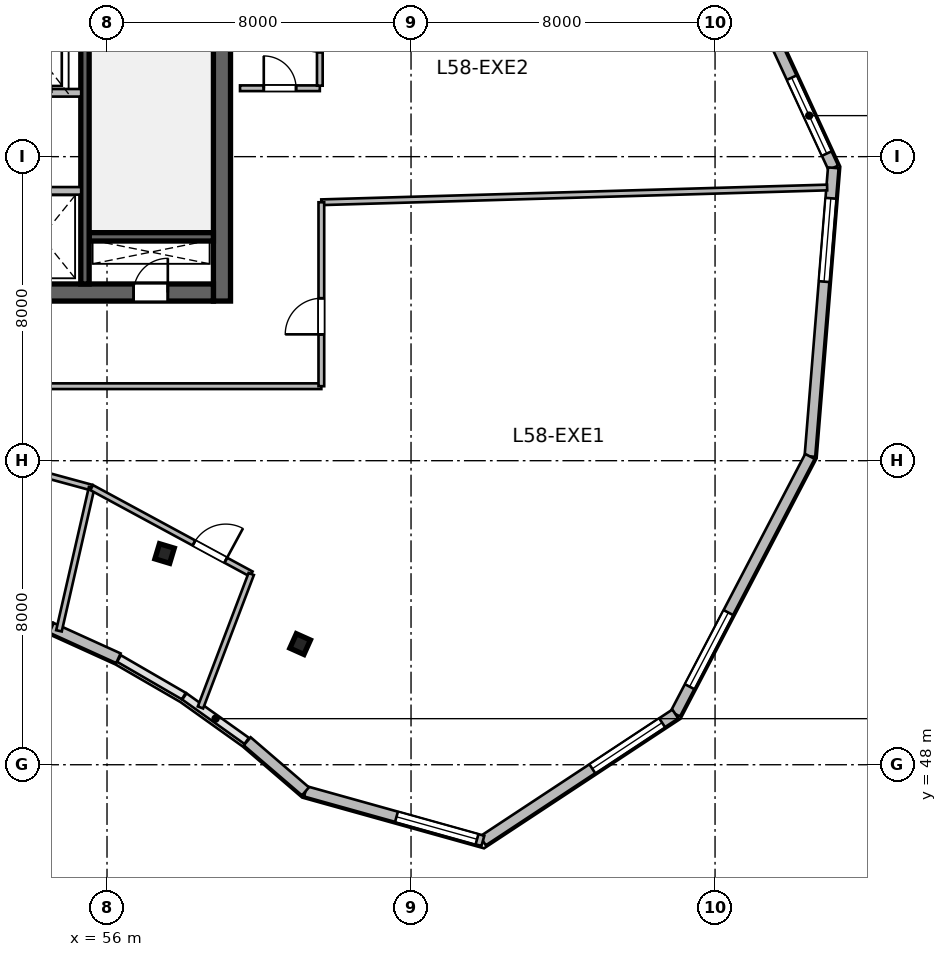
"""IFC4 building model, lengths in metres.
Left out: names, types, materials, properties, quantities, classifications, styles, units other than length and angle.
Written with IfcOpenShell. Run it as: python <this file> out.ifc"""

import sys

from ifc_helpers import new_model, si_unit, direction, frame, frame_2d, origin, origin_2d, place, context, subcontext, project, spatial, rectangle, i_section, extrude, source, transform, mapped, element, fill, save


model = new_model("IFC4")
c1 = context("Model", 3, precision=1e-05, world=origin(), true_north=direction((0.0, 1.0)))
c2 = subcontext(c1, "Body", "Model", "MODEL_VIEW")
j1 = project(units=[si_unit("LENGTHUNIT", "METRE"), si_unit("PLANEANGLEUNIT", "RADIAN")], contexts=[c1])
p1 = place(None, origin())
s1 = spatial("IfcSite", under=j1, at=p1, CompositionType="ELEMENT")
p2 = place(p1, origin())
s2 = spatial("IfcBuilding", under=s1, at=p2, CompositionType="ELEMENT")
p3 = place(p2, frame((0.0, 0.0, 239.1)))
s3 = spatial("IfcBuildingStorey", under=s2, at=p3, CompositionType="ELEMENT", Elevation=239.1)
m1 = source(origin(), c2, "Body", "SweptSolid", [
    extrude(rectangle(XDim=12.0, YDim=0.45, at=frame_2d((6.0, 0.0))), origin(), (0.0, 0.0, 1.0), 3.9),
])
p4 = place(p3, frame((59.025, 60.2, 0.0), z_axis=(0.0, 0.0, 1.0), x_axis=(0.0, 1.0, 0.0)))
e1 = element("IfcWall", 1, at=p4, inside=s3, PredefinedType="SHEAR", context=c2, shape_type="MappedRepresentation", body=[
    mapped(m1, transform((0.0, 0.0, 0.0), scale=1.0)),
])
m2 = source(origin(), c2, "Body", "SweptSolid", [
    extrude(rectangle(XDim=21.6, YDim=0.45, at=frame_2d((10.8, 0.0))), origin(), (0.0, 0.0, 1.0), 3.9),
])
p5 = place(p3, frame((37.2, 60.425, 0.0), z_axis=(0.0, 0.0, 1.0), x_axis=(1.0, 0.0, 0.0)))
e2 = element("IfcWall", 2, at=p5, inside=s3, PredefinedType="SHEAR", context=c2, shape_type="MappedRepresentation", body=[
    mapped(m2, transform((0.0, 0.0, 0.0), scale=1.0)),
])
p6 = place(p5, frame((1.1, 0.0, 0.0)))
e3 = element("IfcOpeningElement", 3, at=p6, cuts=e2, PredefinedType="OPENING", context=c2, shape_type="SweptSolid", body=[
    extrude(rectangle(XDim=1.15, YDim=2.15, at=frame_2d((0.575, 1.075))), frame((0.0, 0.235, 0.0), z_axis=(0.0, -1.0, 0.0), x_axis=(1.0, 0.0, 0.0)), (0.0, 0.0, 1.0), 0.47),
])
p7 = place(p5, frame((19.5, 0.0, 0.0)))
e4 = element("IfcOpeningElement", 4, at=p7, cuts=e2, PredefinedType="OPENING", context=c2, shape_type="SweptSolid", body=[
    extrude(rectangle(XDim=0.9, YDim=2.1, at=frame_2d((0.45, 1.05))), frame((0.0, 0.235, 0.0), z_axis=(0.0, -1.0, 0.0), x_axis=(1.0, 0.0, 0.0)), (0.0, 0.0, 1.0), 0.47),
])
p8 = place(p5, frame((12.02, 0.0, 0.0)))
e5 = element("IfcOpeningElement", 5, at=p8, cuts=e2, PredefinedType="OPENING", context=c2, shape_type="SweptSolid", body=[
    extrude(rectangle(XDim=1.6, YDim=2.15, at=frame_2d((0.8, 1.075))), frame((0.0, 0.235, 0.0), z_axis=(0.0, -1.0, 0.0), x_axis=(1.0, 0.0, 0.0)), (0.0, 0.0, 1.0), 0.47),
])
m3 = source(origin(), c2, "Body", "SweptSolid", [
    extrude(rectangle(XDim=3.27, YDim=0.22, at=frame_2d((1.635, 0.0))), origin(), (0.0, 0.0, 1.0), 3.9),
])
p9 = place(p3, frame((55.53, 61.89, 0.0), z_axis=(0.0, 0.0, 1.0), x_axis=(1.0, 0.0, 0.0)))
e6 = element("IfcWall", 6, at=p9, inside=s3, PredefinedType="SHEAR", context=c2, shape_type="MappedRepresentation", body=[
    mapped(m3, transform((0.0, 0.0, 0.0), scale=1.0)),
])
m4 = source(origin(), c2, "Body", "SweptSolid", [
    extrude(rectangle(XDim=11.1, YDim=0.22, at=frame_2d((5.55, 0.0))), origin(), (0.0, 0.0, 1.0), 3.9),
])
p10 = place(p3, frame((55.42, 60.65, 0.0), z_axis=(0.0, 0.0, 1.0), x_axis=(0.0, 1.0, 0.0)))
e7 = element("IfcWall", 7, at=p10, inside=s3, PredefinedType="SHEAR", context=c2, shape_type="MappedRepresentation", body=[
    mapped(m4, transform((0.0, 0.0, 0.0), scale=1.0)),
])
p11 = place(p10, frame((9.595, 0.0, 0.0)))
e8 = element("IfcOpeningElement", 8, at=p11, cuts=e7, PredefinedType="OPENING", context=c2, shape_type="SweptSolid", body=[
    extrude(rectangle(XDim=1.15, YDim=2.15, at=frame_2d((0.575, 1.075))), frame((0.0, 0.12, 0.0), z_axis=(0.0, -1.0, 0.0), x_axis=(1.0, 0.0, 0.0)), (0.0, 0.0, 1.0), 0.24),
])
m5 = source(origin(), c2, "Body", "SweptSolid", [
    extrude(i_section(OverallWidth=0.406, OverallDepth=0.416, WebThickness=0.03, FlangeThickness=0.048, at=origin_2d()), origin(), (0.0, 0.0, 1.0), 3.9),
])
for number, where, z_axis, x_axis in (
    (9, (57.515, 53.558, 0.0), (0.0, 0.0, 1.0), (0.289, 0.957, 0.0)),
    (10, (61.082, 51.175, 0.0), (0.0, 0.0, 1.0), (0.409, 0.912, 0.0)),
):
    element("IfcColumn", number, at=place(p3, frame(where, z_axis=z_axis, x_axis=x_axis)), inside=s3, PredefinedType="COLUMN", context=c2, shape_type="MappedRepresentation", body=[
        mapped(m5, transform((0.0, 0.0, 0.0), scale=1.0)),
    ])
m6 = source(origin(), c2, "Body", "SweptSolid", [
    extrude(rectangle(XDim=6.05, YDim=0.28, at=frame_2d((3.025, 0.0))), origin(), (0.0, 0.0, 1.0), 3.65),
])
p12 = place(p3, frame((72.574, 69.198, 0.0), z_axis=(0.0, 0.0, 1.0), x_axis=(0.41942922905, -0.907788037935, 0.0)))
e11 = element("IfcWall", 11, at=p12, inside=s3, PredefinedType="SOLIDWALL", context=c2, shape_type="MappedRepresentation", body=[
    mapped(m6, transform((0.0, 0.0, 0.0), scale=1.0)),
])
p13 = place(p12, frame((3.437, 0.0, 0.95)))
e12 = element("IfcOpeningElement", 12, at=p13, cuts=e11, PredefinedType="OPENING", context=c2, shape_type="SweptSolid", body=[
    extrude(rectangle(XDim=2.2, YDim=2.1, at=frame_2d((1.1, 1.05))), frame((0.0, 0.15, 0.0), z_axis=(0.0, -1.0, 0.0), x_axis=(1.0, 0.0, 0.0)), (0.0, 0.0, 1.0), 0.3),
])
m7 = source(origin(), c2, "Body", "SweptSolid", [
    extrude(rectangle(XDim=7.618, YDim=0.28, at=frame_2d((3.809, 0.0))), origin(), (0.0, 0.0, 1.0), 3.65),
])
p14 = place(p3, frame((75.112, 63.707, 0.0), z_axis=(0.0, 0.0, 1.0), x_axis=(-0.080820171031, -0.996728699273, 0.0)))
e13 = element("IfcWall", 13, at=p14, inside=s3, PredefinedType="SOLIDWALL", context=c2, shape_type="MappedRepresentation", body=[
    mapped(m7, transform((0.0, 0.0, 0.0), scale=1.0)),
])
p15 = place(p14, frame((0.805, 0.0, 0.95)))
e14 = element("IfcOpeningElement", 14, at=p15, cuts=e13, PredefinedType="OPENING", context=c2, shape_type="SweptSolid", body=[
    extrude(rectangle(XDim=2.2, YDim=2.1, at=frame_2d((1.1, 1.05))), frame((0.0, 0.15, 0.0), z_axis=(0.0, -1.0, 0.0), x_axis=(1.0, 0.0, 0.0)), (0.0, 0.0, 1.0), 0.3),
])
m8 = source(origin(), c2, "Body", "SweptSolid", [
    extrude(rectangle(XDim=7.648, YDim=0.28, at=frame_2d((3.824, 0.0))), origin(), (0.0, 0.0, 1.0), 3.65),
])
p16 = place(p3, frame((74.496, 56.113, 0.0), z_axis=(0.0, 0.0, 1.0), x_axis=(-0.463116873665, -0.886297219519, 0.0)))
e15 = element("IfcWall", 15, at=p16, inside=s3, PredefinedType="SOLIDWALL", context=c2, shape_type="MappedRepresentation", body=[
    mapped(m8, transform((0.0, 0.0, 0.0), scale=1.0)),
])
p17 = place(p16, frame((4.636, 0.0, 0.95)))
e16 = element("IfcOpeningElement", 16, at=p17, cuts=e15, PredefinedType="OPENING", context=c2, shape_type="SweptSolid", body=[
    extrude(rectangle(XDim=2.2, YDim=2.1, at=frame_2d((1.1, 1.05))), frame((0.0, 0.15, 0.0), z_axis=(0.0, -1.0, 0.0), x_axis=(1.0, 0.0, 0.0)), (0.0, 0.0, 1.0), 0.3),
])
m9 = source(origin(), c2, "Body", "SweptSolid", [
    extrude(rectangle(XDim=6.065, YDim=0.28, at=frame_2d((3.033, 0.0))), origin(), (0.0, 0.0, 1.0), 3.65),
])
p18 = place(p3, frame((70.954, 49.335, 0.0), z_axis=(0.0, 0.0, 1.0), x_axis=(-0.834857303202, -0.550466423399, 0.0)))
e17 = element("IfcWall", 17, at=p18, inside=s3, PredefinedType="SOLIDWALL", context=c2, shape_type="MappedRepresentation", body=[
    mapped(m9, transform((0.0, 0.0, 0.0), scale=1.0)),
])
p19 = place(p18, frame((0.416, 0.0, 0.95)))
e18 = element("IfcOpeningElement", 18, at=p19, cuts=e17, PredefinedType="OPENING", context=c2, shape_type="SweptSolid", body=[
    extrude(rectangle(XDim=2.2, YDim=2.1, at=frame_2d((1.1, 1.05))), frame((0.0, 0.15, 0.0), z_axis=(0.0, -1.0, 0.0), x_axis=(1.0, 0.0, 0.0)), (0.0, 0.0, 1.0), 0.3),
])
m10 = source(origin(), c2, "Body", "SweptSolid", [
    extrude(rectangle(XDim=4.847, YDim=0.28, at=frame_2d((2.424, 0.0))), origin(), (0.0, 0.0, 1.0), 3.65),
])
p20 = place(p3, frame((65.891, 45.996, 0.0), z_axis=(0.0, 0.0, 1.0), x_axis=(-0.963208430762, 0.268755500238, 0.0)))
e19 = element("IfcWall", 19, at=p20, inside=s3, PredefinedType="SOLIDWALL", context=c2, shape_type="MappedRepresentation", body=[
    mapped(m10, transform((0.0, 0.0, 0.0), scale=1.0)),
])
p21 = place(p20, frame((0.16, 0.0, 0.95)))
e20 = element("IfcOpeningElement", 20, at=p21, cuts=e19, PredefinedType="OPENING", context=c2, shape_type="SweptSolid", body=[
    extrude(rectangle(XDim=2.2, YDim=2.1, at=frame_2d((1.1, 1.05))), frame((0.0, 0.15, 0.0), z_axis=(0.0, -1.0, 0.0), x_axis=(1.0, 0.0, 0.0)), (0.0, 0.0, 1.0), 0.3),
])
m11 = source(origin(), c2, "Body", "SweptSolid", [
    extrude(rectangle(XDim=2.022, YDim=0.28, at=frame_2d((1.011, 0.0))), origin(), (0.0, 0.0, 1.0), 3.65),
])
p22 = place(p3, frame((61.222, 47.299, 0.0), z_axis=(0.0, 0.0, 1.0), x_axis=(-0.758343943716, 0.651854633358, 0.0)))
e21 = element("IfcWall", 21, at=p22, inside=s3, PredefinedType="SOLIDWALL", context=c2, shape_type="MappedRepresentation", body=[
    mapped(m11, transform((0.0, 0.0, 0.0), scale=1.0)),
])
m12 = source(origin(), c2, "Body", "SweptSolid", [
    extrude(rectangle(XDim=1.933, YDim=0.28, at=frame_2d((0.966, 0.0))), origin(), (0.0, 0.0, 1.0), 3.65),
])
p23 = place(p3, frame((56.3, 50.802, 0.0), z_axis=(0.0, 0.0, 1.0), x_axis=(-0.910478916145, 0.413555489936, 0.0)))
e22 = element("IfcWall", 22, at=p23, inside=s3, PredefinedType="SOLIDWALL", context=c2, shape_type="MappedRepresentation", body=[
    mapped(m12, transform((0.0, 0.0, 0.0), scale=1.0)),
])
m13 = source(origin(), c2, "Body", "SweptSolid", [
    extrude(rectangle(XDim=1.901, YDim=0.28, at=frame_2d((0.951, 0.0))), origin(), (0.0, 0.0, 1.0), 3.65),
])
p24 = place(p3, frame((54.523, 51.608, 0.0), z_axis=(0.0, 0.0, 1.0), x_axis=(-0.94793587841, 0.318461254194, 0.0)))
e23 = element("IfcWall", 23, at=p24, inside=s3, PredefinedType="SOLIDWALL", context=c2, shape_type="MappedRepresentation", body=[
    mapped(m13, transform((0.0, 0.0, 0.0), scale=1.0)),
])
m14 = source(origin(), c2, "Body", "SweptSolid", [
    extrude(rectangle(XDim=5.62, YDim=0.2, at=frame_2d((2.81, 0.0))), origin(), (0.0, 0.0, 1.0), 3.65),
])
p25 = place(p3, frame((49.7, 65.68, 0.0), z_axis=(0.0, 0.0, 1.0), x_axis=(1.0, 0.0, 0.0)))
e24 = element("IfcWall", 24, at=p25, inside=s3, PredefinedType="SOLIDWALL", context=c2, shape_type="MappedRepresentation", body=[
    mapped(m14, transform((0.0, 0.0, 0.0), scale=1.0)),
])
m15 = source(origin(), c2, "Body", "SweptSolid", [
    extrude(rectangle(XDim=4.1, YDim=0.2, at=frame_2d((2.05, 0.0))), origin(), (0.0, 0.0, 1.0), 3.65),
])
p26 = place(p3, frame((51.22, 63.1, 0.0), z_axis=(0.0, 0.0, 1.0), x_axis=(1.0, 0.0, 0.0)))
e25 = element("IfcWall", 25, at=p26, inside=s3, PredefinedType="SOLIDWALL", context=c2, shape_type="MappedRepresentation", body=[
    mapped(m15, transform((0.0, 0.0, 0.0), scale=1.0)),
])
m16 = source(origin(), c2, "Body", "SweptSolid", [
    extrude(rectangle(XDim=2.1, YDim=0.15, at=frame_2d((1.05, 0.0))), origin(), (0.0, 0.0, 1.0), 3.65),
])
p27 = place(p3, frame((59.5, 65.8, 0.0), z_axis=(0.0, 0.0, 1.0), x_axis=(1.0, 0.0, 0.0)))
e26 = element("IfcWall", 26, at=p27, inside=s3, PredefinedType="PARTITIONING", context=c2, shape_type="MappedRepresentation", body=[
    mapped(m16, transform((0.0, 0.0, 0.0), scale=1.0)),
])
p28 = place(p27, frame((0.625, 0.0, 0.0)))
e27 = element("IfcOpeningElement", 27, at=p28, cuts=e26, PredefinedType="OPENING", context=c2, shape_type="SweptSolid", body=[
    extrude(rectangle(XDim=0.85, YDim=2.1, at=frame_2d((0.425, 1.05))), frame((0.0, 0.085, 0.0), z_axis=(0.0, -1.0, 0.0), x_axis=(1.0, 0.0, 0.0)), (0.0, 0.0, 1.0), 0.17),
])
m17 = source(origin(), c2, "Body", "SweptSolid", [
    extrude(rectangle(XDim=3.565, YDim=0.15, at=frame_2d((1.783, 0.0))), origin(), (0.0, 0.0, 1.0), 3.65),
])
p29 = place(p3, frame((61.6, 65.867, 0.0), z_axis=(0.0, 0.0, 1.0), x_axis=(0.0, 1.0, 0.0)))
e28 = element("IfcWall", 28, at=p29, inside=s3, PredefinedType="PARTITIONING", context=c2, shape_type="MappedRepresentation", body=[
    mapped(m17, transform((0.0, 0.0, 0.0), scale=1.0)),
])
p30 = place(p29, frame((0.88, 0.0, 0.0)))
e29 = element("IfcOpeningElement", 29, at=p30, cuts=e28, PredefinedType="OPENING", context=c2, shape_type="SweptSolid", body=[
    extrude(rectangle(XDim=0.95, YDim=2.1, at=frame_2d((0.475, 1.05))), frame((0.0, 0.085, 0.0), z_axis=(0.0, -1.0, 0.0), x_axis=(1.0, 0.0, 0.0)), (0.0, 0.0, 1.0), 0.17),
])
m18 = source(origin(), c2, "Body", "SweptSolid", [
    extrude(rectangle(XDim=5.058, YDim=0.15, at=frame_2d((2.529, 0.0))), origin(), (0.0, 0.0, 1.0), 3.65),
])
p31 = place(p3, frame((50.716, 56.623, 0.0), z_axis=(0.0, 0.0, 1.0), x_axis=(0.964782753739, -0.263047976781, 0.0)))
e30 = element("IfcWall", 30, at=p31, inside=s3, PredefinedType="PARTITIONING", context=c2, shape_type="MappedRepresentation", body=[
    mapped(m18, transform((0.0, 0.0, 0.0), scale=1.0)),
])
p32 = place(p31, frame((2.804, 0.0, 0.0)))
e31 = element("IfcOpeningElement", 31, at=p32, cuts=e30, PredefinedType="OPENING", context=c2, shape_type="SweptSolid", body=[
    extrude(rectangle(XDim=0.95, YDim=2.1, at=frame_2d((0.475, 1.05))), frame((0.0, 0.085, 0.0), z_axis=(0.0, -1.0, 0.0), x_axis=(1.0, 0.0, 0.0)), (0.0, 0.0, 1.0), 0.17),
])
m19 = source(origin(), c2, "Body", "SweptSolid", [
    extrude(rectangle(XDim=3.865, YDim=0.15, at=frame_2d((1.933, 0.0))), origin(), (0.0, 0.0, 1.0), 3.65),
])
p33 = place(p3, frame((54.736, 51.523, 0.0), z_axis=(0.0, 0.0, 1.0), x_axis=(0.222390882477, 0.974957586458, 0.0)))
e32 = element("IfcWall", 32, at=p33, inside=s3, PredefinedType="PARTITIONING", context=c2, shape_type="MappedRepresentation", body=[
    mapped(m19, transform((0.0, 0.0, 0.0), scale=1.0)),
])
m20 = source(origin(), c2, "Body", "SweptSolid", [
    extrude(rectangle(XDim=4.775, YDim=0.15, at=frame_2d((2.387, 0.0))), origin(), (0.0, 0.0, 1.0), 3.65),
])
p34 = place(p3, frame((55.596, 55.292, 0.0), z_axis=(0.0, 0.0, 1.0), x_axis=(0.879401686059, -0.476080533688, 0.0)))
e33 = element("IfcWall", 33, at=p34, inside=s3, PredefinedType="PARTITIONING", context=c2, shape_type="MappedRepresentation", body=[
    mapped(m20, transform((0.0, 0.0, 0.0), scale=1.0)),
])
p35 = place(p34, frame((3.062, 0.0, 0.0)))
e34 = element("IfcOpeningElement", 34, at=p35, cuts=e33, PredefinedType="OPENING", context=c2, shape_type="SweptSolid", body=[
    extrude(rectangle(XDim=0.95, YDim=2.1, at=frame_2d((0.475, 1.05))), frame((0.0, 0.085, 0.0), z_axis=(0.0, -1.0, 0.0), x_axis=(1.0, 0.0, 0.0)), (0.0, 0.0, 1.0), 0.17),
])
m21 = source(origin(), c2, "Body", "SweptSolid", [
    extrude(rectangle(XDim=3.757, YDim=0.15, at=frame_2d((1.879, 0.0))), origin(), (0.0, 0.0, 1.0), 3.65),
])
p36 = place(p3, frame((58.459, 49.507, 0.0), z_axis=(0.0, 0.0, 1.0), x_axis=(0.355427833237, 0.93470372598, 0.0)))
e35 = element("IfcWall", 35, at=p36, inside=s3, PredefinedType="PARTITIONING", context=c2, shape_type="MappedRepresentation", body=[
    mapped(m21, transform((0.0, 0.0, 0.0), scale=1.0)),
])
m22 = source(origin(), c2, "Body", "SweptSolid", [
    extrude(rectangle(XDim=12.39, YDim=0.15, at=frame_2d((6.195, 0.0))), origin(), (0.0, 0.0, 1.0), 3.65),
])
p37 = place(p3, frame((49.25, 57.96, 0.0), z_axis=(0.0, 0.0, 1.0), x_axis=(1.0, 0.0, 0.0)))
e36 = element("IfcWall", 36, at=p37, inside=s3, PredefinedType="PARTITIONING", context=c2, shape_type="MappedRepresentation", body=[
    mapped(m22, transform((0.0, 0.0, 0.0), scale=1.0)),
])
m23 = source(origin(), c2, "Body", "SweptSolid", [
    extrude(rectangle(XDim=13.315, YDim=0.15, at=frame_2d((6.657, 0.0))), origin(), (0.0, 0.0, 1.0), 3.65),
])
p38 = place(p3, frame((61.64, 62.8, 0.0), z_axis=(0.0, 0.0, 1.0), x_axis=(0.999574400598, 0.029172207124, 0.0)))
e37 = element("IfcWall", 37, at=p38, inside=s3, PredefinedType="PARTITIONING", context=c2, shape_type="MappedRepresentation", body=[
    mapped(m23, transform((0.0, 0.0, 0.0), scale=1.0)),
])
m24 = source(origin(), c2, "Body", "SweptSolid", [
    extrude(rectangle(XDim=4.84, YDim=0.15, at=frame_2d((2.42, 0.0))), origin(), (0.0, 0.0, 1.0), 3.65),
])
p39 = place(p3, frame((61.64, 57.96, 0.0), z_axis=(0.0, 0.0, 1.0), x_axis=(0.0, 1.0, 0.0)))
e38 = element("IfcWall", 38, at=p39, inside=s3, PredefinedType="PARTITIONING", context=c2, shape_type="MappedRepresentation", body=[
    mapped(m24, transform((0.0, 0.0, 0.0), scale=1.0)),
])
p40 = place(p39, frame((1.364, 0.0, 0.0)))
e39 = element("IfcOpeningElement", 39, at=p40, cuts=e38, PredefinedType="OPENING", context=c2, shape_type="SweptSolid", body=[
    extrude(rectangle(XDim=0.95, YDim=2.1, at=frame_2d((0.475, 1.05))), frame((0.0, 0.085, 0.0), z_axis=(0.0, -1.0, 0.0), x_axis=(1.0, 0.0, 0.0)), (0.0, 0.0, 1.0), 0.17),
])
m25 = source(origin(), c2, "Body", "SweptSolid", [
    extrude(rectangle(XDim=2.2, YDim=2.1, at=frame_2d((1.1, 1.05))), frame((0.0, 0.03, 0.0), z_axis=(0.0, -1.0, 0.0), x_axis=(1.0, 0.0, 0.0)), (0.0, 0.0, 1.0), 0.06),
])
p41 = place(p13, origin())
e40 = element("IfcWindow", 40, at=p41, inside=s3, PartitioningType="TRIPLE_PANEL_VERTICAL", PredefinedType="WINDOW", context=c2, shape_type="MappedRepresentation", body=[
    mapped(m25, transform((0.0, 0.0, 0.0), scale=1.0)),
])
fill(e12, e40)
p42 = place(p15, origin())
e41 = element("IfcWindow", 41, at=p42, inside=s3, PartitioningType="TRIPLE_PANEL_VERTICAL", PredefinedType="WINDOW", context=c2, shape_type="MappedRepresentation", body=[
    mapped(m25, transform((0.0, 0.0, 0.0), scale=1.0)),
])
fill(e14, e41)
p43 = place(p17, origin())
e42 = element("IfcWindow", 42, at=p43, inside=s3, PartitioningType="TRIPLE_PANEL_VERTICAL", PredefinedType="WINDOW", context=c2, shape_type="MappedRepresentation", body=[
    mapped(m25, transform((0.0, 0.0, 0.0), scale=1.0)),
])
fill(e16, e42)
p44 = place(p19, origin())
e43 = element("IfcWindow", 43, at=p44, inside=s3, PartitioningType="TRIPLE_PANEL_VERTICAL", PredefinedType="WINDOW", context=c2, shape_type="MappedRepresentation", body=[
    mapped(m25, transform((0.0, 0.0, 0.0), scale=1.0)),
])
fill(e18, e43)
p45 = place(p21, origin())
e44 = element("IfcWindow", 44, at=p45, inside=s3, PartitioningType="TRIPLE_PANEL_VERTICAL", PredefinedType="WINDOW", context=c2, shape_type="MappedRepresentation", body=[
    mapped(m25, transform((0.0, 0.0, 0.0), scale=1.0)),
])
fill(e20, e44)
m26 = source(origin(), c2, "Body", "SweptSolid", [
    extrude(rectangle(XDim=0.9, YDim=2.1, at=frame_2d((0.45, 1.05))), frame((0.0, 0.025, 0.0), z_axis=(0.0, -1.0, 0.0), x_axis=(1.0, 0.0, 0.0)), (0.0, 0.0, 1.0), 0.05),
])
p46 = place(p7, origin())
e45 = element("IfcDoor", 45, at=p46, inside=s3, OperationType="SINGLE_SWING_RIGHT", PredefinedType="DOOR", context=c2, shape_type="MappedRepresentation", body=[
    mapped(m26, transform((0.0, 0.0, 0.0), scale=1.0)),
])
fill(e4, e45)
m27 = source(origin(), c2, "Body", "SweptSolid", [
    extrude(rectangle(XDim=0.85, YDim=2.1, at=frame_2d((0.425, 1.05))), frame((0.0, 0.025, 0.0), z_axis=(0.0, -1.0, 0.0), x_axis=(1.0, 0.0, 0.0)), (0.0, 0.0, 1.0), 0.05),
])
p47 = place(p28, origin())
e46 = element("IfcDoor", 46, at=p47, inside=s3, OperationType="SINGLE_SWING_LEFT", PredefinedType="DOOR", context=c2, shape_type="MappedRepresentation", body=[
    mapped(m27, transform((0.0, 0.0, 0.0), scale=1.0)),
])
fill(e27, e46)
m28 = source(origin(), c2, "Body", "SweptSolid", [
    extrude(rectangle(XDim=0.95, YDim=2.1, at=frame_2d((0.475, 1.05))), frame((0.0, 0.025, 0.0), z_axis=(0.0, -1.0, 0.0), x_axis=(1.0, 0.0, 0.0)), (0.0, 0.0, 1.0), 0.05),
])
p48 = place(p35, origin())
e47 = element("IfcDoor", 47, at=p48, inside=s3, OperationType="SINGLE_SWING_RIGHT", PredefinedType="DOOR", context=c2, shape_type="MappedRepresentation", body=[
    mapped(m28, transform((0.0, 0.0, 0.0), scale=1.0)),
])
fill(e34, e47)
p49 = place(p40, origin())
e48 = element("IfcDoor", 48, at=p49, inside=s3, OperationType="SINGLE_SWING_LEFT", PredefinedType="DOOR", context=c2, shape_type="MappedRepresentation", body=[
    mapped(m28, transform((0.0, 0.0, 0.0), scale=1.0)),
])
fill(e39, e48)
p50 = place(p30, origin())
e49 = element("IfcDoor", 49, at=p50, inside=s3, OperationType="SINGLE_SWING_RIGHT", PredefinedType="DOOR", context=c2, shape_type="MappedRepresentation", body=[
    mapped(m28, transform((0.0, 0.0, 0.0), scale=1.0)),
])
fill(e29, e49)
save(model, sys.argv[1])
